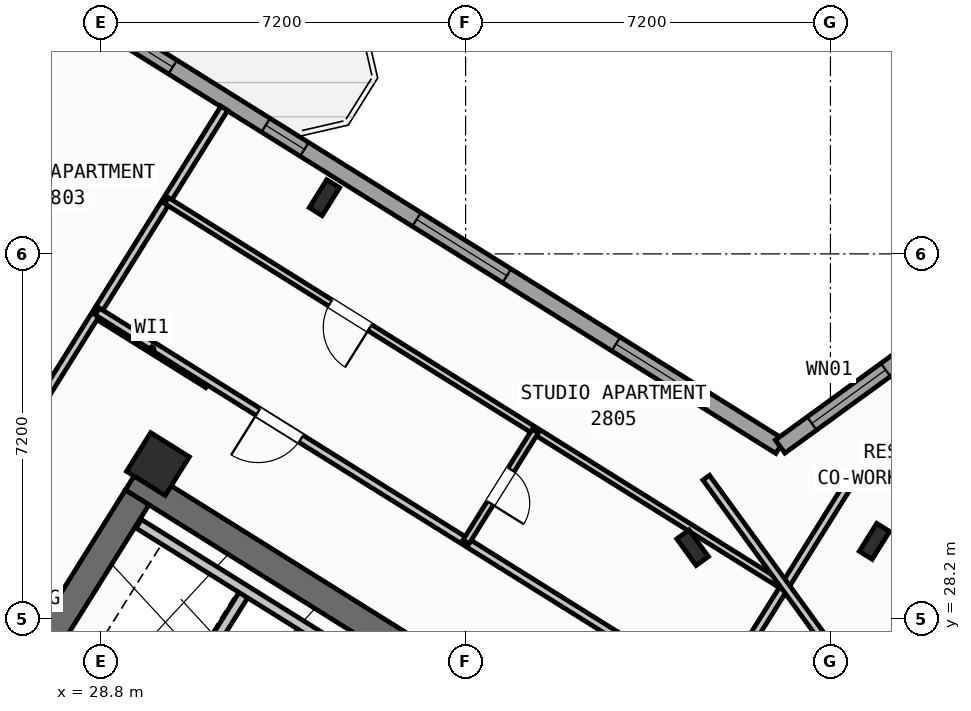
"""IFC4 building model, lengths in metres.
Left out: names, types, materials, properties, quantities, classifications, styles, units other than length and angle.
Written with IfcOpenShell. Run it as: python <this file> out.ifc"""

import sys

from ifc_helpers import new_model, si_unit, direction, frame, frame_2d, origin, origin_2d, place, context, subcontext, project, spatial, rectangle, hollow_rectangle, i_section, extrude, source, transform, mapped, element, fill, save


model = new_model("IFC4")
c1 = context("Model", 3, precision=1e-05, world=origin(), true_north=direction((0.0, 1.0)))
c2 = subcontext(c1, "Body", "Model", "MODEL_VIEW")
j1 = project(units=[si_unit("LENGTHUNIT", "METRE"), si_unit("PLANEANGLEUNIT", "RADIAN")], contexts=[c1])
p1 = place(None, origin())
s1 = spatial("IfcSite", under=j1, at=p1, CompositionType="ELEMENT")
p2 = place(p1, origin())
s2 = spatial("IfcBuilding", under=s1, at=p2, CompositionType="ELEMENT")
p3 = place(p2, frame((0.0, 0.0, 112.5)))
s3 = spatial("IfcBuildingStorey", under=s2, at=p3, CompositionType="ELEMENT", Elevation=112.5)
p4 = place(p3, frame((40.573, 24.01, 0.0), z_axis=(0.0, 0.0, 1.0), x_axis=(-0.848047359947, 0.529920442413, 0.0)))
e1 = element("IfcWall", 1, at=p4, inside=s3, PredefinedType="SHEAR", context=c2, shape_type="SweptSolid", body=[
    extrude(rectangle(XDim=13.14, YDim=0.55, at=frame_2d((6.57, 0.0))), origin(), (0.0, 0.0, 1.0), 3.35),
])
p5 = place(p3, frame((29.517, 30.594, 0.0), z_axis=(0.0, 0.0, 1.0), x_axis=(-0.529906864564, -0.848055844204, 0.0)))
e2 = element("IfcWall", 2, at=p5, inside=s3, PredefinedType="SHEAR", context=c2, shape_type="SweptSolid", body=[
    extrude(rectangle(XDim=3.575, YDim=0.55, at=frame_2d((1.788, 0.0))), origin(), (0.0, 0.0, 1.0), 3.35),
])
p6 = place(p3, frame((44.365, 24.142, 0.0), z_axis=(0.0, 0.0, 1.0), x_axis=(0.809024304885, 0.587775190107, 0.0)))
e3 = element("IfcWall", 3, at=p6, inside=s3, PredefinedType="SHEAR", context=c2, shape_type="SweptSolid", body=[
    extrude(rectangle(XDim=12.34, YDim=0.55, at=frame_2d((6.17, 0.0))), origin(), (0.0, 0.0, 1.0), 3.35),
])
m1 = source(origin(), c2, "Body", "SweptSolid", [
    extrude(i_section(OverallWidth=0.3, OverallDepth=0.65, WebThickness=0.016, FlangeThickness=0.031, at=origin_2d()), origin(), (0.0, 0.0, 1.0), 3.6),
])
for number, where, z_axis, x_axis in (
    (4, (44.068, 29.726, 0.0), (0.0, 0.0, 1.0), (-0.848, 0.53, 0.0)),
    (5, (33.213, 36.509, 0.0), (0.0, 0.0, 1.0), (-0.848, 0.53, 0.0)),
):
    element("IfcColumn", number, at=place(p3, frame(where, z_axis=z_axis, x_axis=x_axis)), inside=s3, PredefinedType="COLUMN", context=c2, shape_type="MappedRepresentation", body=[
        mapped(m1, transform((0.0, 0.0, 0.0), scale=1.0)),
    ])
m2 = source(origin(), c2, "Body", "SweptSolid", [
    extrude(hollow_rectangle(XDim=0.9, YDim=0.9, WallThickness=0.036, at=origin_2d()), origin(), (0.0, 0.0, 1.0), 3.6),
])
p7 = place(p3, frame((29.928, 31.251, 0.0), z_axis=(0.0, 0.0, 1.0), x_axis=(-0.848048096156, 0.529919264233, 0.0)))
e6 = element("IfcColumn", 6, at=p7, inside=s3, PredefinedType="COLUMN", context=c2, shape_type="MappedRepresentation", body=[
    mapped(m2, transform((0.0, 0.0, 0.0), scale=1.0)),
])
p8 = place(p3, frame((40.479, 29.601, 0.0), z_axis=(0.0, 0.0, 1.0), x_axis=(0.809016994375, 0.587785252292, 0.0)))
e7 = element("IfcColumn", 7, at=p8, inside=s3, PredefinedType="COLUMN", context=c2, shape_type="MappedRepresentation", body=[
    mapped(m1, transform((0.0, 0.0, 0.0), scale=1.0)),
])
p9 = place(p3, frame((31.76, 12.183, 0.0), z_axis=(0.0, 0.0, 1.0), x_axis=(-0.848047074256, 0.529920899612, 0.0)))
e8 = element("IfcWall", 8, at=p9, inside=s3, PredefinedType="STANDARD", context=c2, shape_type="SweptSolid", body=[
    extrude(rectangle(XDim=30.652, YDim=0.32, at=frame_2d((15.326, 0.0))), origin(), (0.0, 0.0, 1.0), 3.35),
])
p10 = place(p9, frame((15.153, 0.0, 0.0)))
e9 = element("IfcOpeningElement", 9, at=p10, cuts=e8, PredefinedType="OPENING", context=c2, shape_type="SweptSolid", body=[
    extrude(rectangle(XDim=1.2, YDim=2.15, at=frame_2d((0.6, 1.075))), frame((0.0, 0.17, 0.0), z_axis=(0.0, -1.0, 0.0), x_axis=(1.0, 0.0, 0.0)), (0.0, 0.0, 1.0), 0.34),
])
p11 = place(p9, frame((2.002, 0.0, 0.8)))
e10 = element("IfcOpeningElement", 10, at=p11, cuts=e8, PredefinedType="OPENING", context=c2, shape_type="SweptSolid", body=[
    extrude(rectangle(XDim=2.1, YDim=1.55, at=frame_2d((1.05, 0.775))), frame((0.0, 0.17, 0.0), z_axis=(0.0, -1.0, 0.0), x_axis=(1.0, 0.0, 0.0)), (0.0, 0.0, 1.0), 0.34),
])
p12 = place(p9, frame((7.206, 0.0, 0.8)))
e11 = element("IfcOpeningElement", 11, at=p12, cuts=e8, PredefinedType="OPENING", context=c2, shape_type="SweptSolid", body=[
    extrude(rectangle(XDim=2.1, YDim=1.55, at=frame_2d((1.05, 0.775))), frame((0.0, 0.17, 0.0), z_axis=(0.0, -1.0, 0.0), x_axis=(1.0, 0.0, 0.0)), (0.0, 0.0, 1.0), 0.34),
])
p13 = place(p9, frame((12.648, 0.0, 1.0)))
e12 = element("IfcOpeningElement", 12, at=p13, cuts=e8, PredefinedType="OPENING", context=c2, shape_type="SweptSolid", body=[
    extrude(rectangle(XDim=0.9, YDim=1.25, at=frame_2d((0.45, 0.625))), frame((0.0, 0.17, 0.0), z_axis=(0.0, -1.0, 0.0), x_axis=(1.0, 0.0, 0.0)), (0.0, 0.0, 1.0), 0.34),
])
p14 = place(p9, frame((19.59, 0.0, 0.95)))
e13 = element("IfcOpeningElement", 13, at=p14, cuts=e8, PredefinedType="OPENING", context=c2, shape_type="SweptSolid", body=[
    extrude(rectangle(XDim=1.2, YDim=1.4, at=frame_2d((0.6, 0.7))), frame((0.0, 0.17, 0.0), z_axis=(0.0, -1.0, 0.0), x_axis=(1.0, 0.0, 0.0)), (0.0, 0.0, 1.0), 0.34),
])
p15 = place(p9, frame((25.966, 0.0, 1.0)))
e14 = element("IfcOpeningElement", 14, at=p15, cuts=e8, PredefinedType="OPENING", context=c2, shape_type="SweptSolid", body=[
    extrude(rectangle(XDim=0.9, YDim=1.25, at=frame_2d((0.45, 0.625))), frame((0.0, 0.17, 0.0), z_axis=(0.0, -1.0, 0.0), x_axis=(1.0, 0.0, 0.0)), (0.0, 0.0, 1.0), 0.34),
])
p16 = place(p9, frame((28.871, 0.0, 1.0)))
e15 = element("IfcOpeningElement", 15, at=p16, cuts=e8, PredefinedType="OPENING", context=c2, shape_type="SweptSolid", body=[
    extrude(rectangle(XDim=0.9, YDim=1.25, at=frame_2d((0.45, 0.625))), frame((0.0, 0.17, 0.0), z_axis=(0.0, -1.0, 0.0), x_axis=(1.0, 0.0, 0.0)), (0.0, 0.0, 1.0), 0.34),
])
p17 = place(p3, frame((17.424, 47.083, 0.0), z_axis=(0.0, 0.0, 1.0), x_axis=(0.848049927979, -0.529916332693, 0.0)))
e16 = element("IfcWall", 16, at=p17, inside=s3, PredefinedType="STANDARD", context=c2, shape_type="SweptSolid", body=[
    extrude(rectangle(XDim=29.223, YDim=0.32, at=frame_2d((14.612, 0.0))), origin(), (0.0, 0.0, 1.0), 3.35),
])
p18 = place(p17, frame((3.77, 0.0, 0.0)))
e17 = element("IfcOpeningElement", 17, at=p18, cuts=e16, PredefinedType="OPENING", context=c2, shape_type="SweptSolid", body=[
    extrude(rectangle(XDim=1.05, YDim=2.15, at=frame_2d((0.525, 1.075))), frame((0.0, 0.17, 0.0), z_axis=(0.0, -1.0, 0.0), x_axis=(1.0, 0.0, 0.0)), (0.0, 0.0, 1.0), 0.34),
])
p19 = place(p17, frame((0.9, 0.0, 0.8)))
e18 = element("IfcOpeningElement", 18, at=p19, cuts=e16, PredefinedType="OPENING", context=c2, shape_type="SweptSolid", body=[
    extrude(rectangle(XDim=2.1, YDim=1.55, at=frame_2d((1.05, 0.775))), frame((0.0, 0.17, 0.0), z_axis=(0.0, -1.0, 0.0), x_axis=(1.0, 0.0, 0.0)), (0.0, 0.0, 1.0), 0.34),
])
p20 = place(p17, frame((6.972, 0.0, 1.0)))
e19 = element("IfcOpeningElement", 19, at=p20, cuts=e16, PredefinedType="OPENING", context=c2, shape_type="SweptSolid", body=[
    extrude(rectangle(XDim=0.9, YDim=1.25, at=frame_2d((0.45, 0.625))), frame((0.0, 0.17, 0.0), z_axis=(0.0, -1.0, 0.0), x_axis=(1.0, 0.0, 0.0)), (0.0, 0.0, 1.0), 0.34),
])
p21 = place(p17, frame((9.847, 0.0, 0.85)))
e20 = element("IfcOpeningElement", 20, at=p21, cuts=e16, PredefinedType="OPENING", context=c2, shape_type="SweptSolid", body=[
    extrude(rectangle(XDim=1.5, YDim=1.5, at=frame_2d((0.75, 0.75))), frame((0.0, 0.17, 0.0), z_axis=(0.0, -1.0, 0.0), x_axis=(1.0, 0.0, 0.0)), (0.0, 0.0, 1.0), 0.34),
])
p22 = place(p17, frame((13.889, 0.0, 0.95)))
e21 = element("IfcOpeningElement", 21, at=p22, cuts=e16, PredefinedType="OPENING", context=c2, shape_type="SweptSolid", body=[
    extrude(rectangle(XDim=1.2, YDim=1.4, at=frame_2d((0.6, 0.7))), frame((0.0, 0.17, 0.0), z_axis=(0.0, -1.0, 0.0), x_axis=(1.0, 0.0, 0.0)), (0.0, 0.0, 1.0), 0.34),
])
p23 = place(p17, frame((17.254, 0.0, 1.0)))
e22 = element("IfcOpeningElement", 22, at=p23, cuts=e16, PredefinedType="OPENING", context=c2, shape_type="SweptSolid", body=[
    extrude(rectangle(XDim=0.9, YDim=1.25, at=frame_2d((0.45, 0.625))), frame((0.0, 0.17, 0.0), z_axis=(0.0, -1.0, 0.0), x_axis=(1.0, 0.0, 0.0)), (0.0, 0.0, 1.0), 0.34),
])
p24 = place(p17, frame((20.764, 0.0, 0.8)))
e23 = element("IfcOpeningElement", 23, at=p24, cuts=e16, PredefinedType="OPENING", context=c2, shape_type="SweptSolid", body=[
    extrude(rectangle(XDim=2.1, YDim=1.55, at=frame_2d((1.05, 0.775))), frame((0.0, 0.17, 0.0), z_axis=(0.0, -1.0, 0.0), x_axis=(1.0, 0.0, 0.0)), (0.0, 0.0, 1.0), 0.34),
])
p25 = place(p17, frame((25.403, 0.0, 0.8)))
e24 = element("IfcOpeningElement", 24, at=p25, cuts=e16, PredefinedType="OPENING", context=c2, shape_type="SweptSolid", body=[
    extrude(rectangle(XDim=2.1, YDim=1.55, at=frame_2d((1.05, 0.775))), frame((0.0, 0.17, 0.0), z_axis=(0.0, -1.0, 0.0), x_axis=(1.0, 0.0, 0.0)), (0.0, 0.0, 1.0), 0.34),
])
p26 = place(p3, frame((42.207, 31.597, 0.0), z_axis=(0.0, 0.0, 1.0), x_axis=(0.809020333377, 0.587780656523, 0.0)))
e25 = element("IfcWall", 25, at=p26, inside=s3, PredefinedType="STANDARD", context=c2, shape_type="SweptSolid", body=[
    extrude(rectangle(XDim=15.223, YDim=0.32, at=frame_2d((7.611, 0.0))), origin(), (0.0, 0.0, 1.0), 3.35),
])
p27 = place(p26, frame((12.82, 0.0, 0.0)))
e26 = element("IfcOpeningElement", 26, at=p27, cuts=e25, PredefinedType="OPENING", context=c2, shape_type="SweptSolid", body=[
    extrude(rectangle(XDim=1.05, YDim=2.15, at=frame_2d((0.525, 1.075))), frame((0.0, 0.17, 0.0), z_axis=(0.0, -1.0, 0.0), x_axis=(1.0, 0.0, 0.0)), (0.0, 0.0, 1.0), 0.34),
])
p28 = place(p26, frame((0.775, 0.0, 0.85)))
e27 = element("IfcOpeningElement", 27, at=p28, cuts=e25, PredefinedType="OPENING", context=c2, shape_type="SweptSolid", body=[
    extrude(rectangle(XDim=1.8, YDim=1.5, at=frame_2d((0.9, 0.75))), frame((0.0, 0.17, 0.0), z_axis=(0.0, -1.0, 0.0), x_axis=(1.0, 0.0, 0.0)), (0.0, 0.0, 1.0), 0.34),
])
p29 = place(p26, frame((5.544, 0.0, 0.85)))
e28 = element("IfcOpeningElement", 28, at=p29, cuts=e25, PredefinedType="OPENING", context=c2, shape_type="SweptSolid", body=[
    extrude(rectangle(XDim=1.8, YDim=1.5, at=frame_2d((0.9, 0.75))), frame((0.0, 0.17, 0.0), z_axis=(0.0, -1.0, 0.0), x_axis=(1.0, 0.0, 0.0)), (0.0, 0.0, 1.0), 0.34),
])
p30 = place(p26, frame((10.219, 0.0, 1.0)))
e29 = element("IfcOpeningElement", 29, at=p30, cuts=e25, PredefinedType="OPENING", context=c2, shape_type="SweptSolid", body=[
    extrude(rectangle(XDim=0.9, YDim=1.25, at=frame_2d((0.45, 0.625))), frame((0.0, 0.17, 0.0), z_axis=(0.0, -1.0, 0.0), x_axis=(1.0, 0.0, 0.0)), (0.0, 0.0, 1.0), 0.34),
])
p31 = place(p3, frame((31.645, 28.716, 0.0), z_axis=(0.0, 0.0, 1.0), x_axis=(-0.52986693015, -0.848080795876, 0.0)))
e30 = element("IfcWall", 30, at=p31, inside=s3, PredefinedType="STANDARD", context=c2, shape_type="SweptSolid", body=[
    extrude(rectangle(XDim=2.66, YDim=0.2, at=frame_2d((1.33, 0.0))), origin(), (0.0, 0.0, 1.0), 3.34),
])
p32 = place(p3, frame((33.363, 27.69, 0.0), z_axis=(0.0, 0.0, 1.0), x_axis=(-0.848047090064, 0.529920874315, 0.0)))
e31 = element("IfcWall", 31, at=p32, inside=s3, PredefinedType="STANDARD", context=c2, shape_type="SweptSolid", body=[
    extrude(rectangle(XDim=4.498, YDim=0.2, at=frame_2d((2.249, 0.0))), origin(), (0.0, 0.0, 1.0), 3.34),
])
p33 = place(p3, frame((30.914, 32.829, 0.0), z_axis=(0.0, 0.0, 1.0), x_axis=(-0.848008813643, 0.529982124211, 0.0)))
e32 = element("IfcWall", 32, at=p33, inside=s3, PredefinedType="PARTITIONING", context=c2, shape_type="SweptSolid", body=[
    extrude(rectangle(XDim=2.61, YDim=0.16, at=frame_2d((1.305, 0.0))), origin(), (0.0, 0.0, 1.0), 3.34),
])
p34 = place(p3, frame((31.239, 38.274, 0.0), z_axis=(0.0, 0.0, 1.0), x_axis=(-0.529925472745, -0.848044216616, 0.0)))
e33 = element("IfcWall", 33, at=p34, inside=s3, PredefinedType="PARTITIONING", context=c2, shape_type="SweptSolid", body=[
    extrude(rectangle(XDim=11.65, YDim=0.16, at=frame_2d((5.825, 0.0))), origin(), (0.0, 0.0, 1.0), 3.34),
])
p35 = place(p3, frame((41.936, 26.012, 0.0), z_axis=(0.0, 0.0, 1.0), x_axis=(-0.848051154596, 0.529914369676, 0.0)))
e34 = element("IfcWall", 34, at=p35, inside=s3, PredefinedType="PARTITIONING", context=c2, shape_type="SweptSolid", body=[
    extrude(rectangle(XDim=15.57, YDim=0.16, at=frame_2d((7.785, 0.0))), origin(), (0.0, 0.0, 1.0), 3.34),
])
p36 = place(p35, frame((10.83, 0.0, 0.0)))
e35 = element("IfcOpeningElement", 35, at=p36, cuts=e34, PredefinedType="OPENING", context=c2, shape_type="SweptSolid", body=[
    extrude(rectangle(XDim=1.0, YDim=2.1, at=frame_2d((0.5, 1.05))), frame((0.0, 0.09, 0.0), z_axis=(0.0, -1.0, 0.0), x_axis=(1.0, 0.0, 0.0)), (0.0, 0.0, 1.0), 0.18),
])
p37 = place(p3, frame((43.704, 31.086, 0.0), z_axis=(0.0, 0.0, 1.0), x_axis=(-0.529906828443, -0.848055866774, 0.0)))
e36 = element("IfcWall", 36, at=p37, inside=s3, PredefinedType="PARTITIONING", context=c2, shape_type="SweptSolid", body=[
    extrude(rectangle(XDim=5.48, YDim=0.16, at=frame_2d((2.74, 0.0))), origin(), (0.0, 0.0, 1.0), 3.34),
])
p38 = place(p3, frame((42.226, 28.873, 0.0), z_axis=(0.0, 0.0, 1.0), x_axis=(-0.848049134363, 0.529917602752, 0.0)))
e37 = element("IfcWall", 37, at=p38, inside=s3, PredefinedType="PLUMBINGWALL", context=c2, shape_type="SweptSolid", body=[
    extrude(rectangle(XDim=14.3, YDim=0.14, at=frame_2d((7.15, 0.0))), origin(), (0.0, 0.0, 1.0), 3.34),
])
p39 = place(p38, frame((9.57, 0.0, 0.0)))
e38 = element("IfcOpeningElement", 38, at=p39, cuts=e37, PredefinedType="OPENING", context=c2, shape_type="SweptSolid", body=[
    extrude(rectangle(XDim=0.92, YDim=2.08, at=frame_2d((0.46, 1.04))), frame((0.0, 0.08, 0.0), z_axis=(0.0, -1.0, 0.0), x_axis=(1.0, 0.0, 0.0)), (0.0, 0.0, 1.0), 0.16),
])
p40 = place(p3, frame((37.375, 31.904, 0.0), z_axis=(0.0, 0.0, 1.0), x_axis=(-0.529913878929, -0.848051461244, 0.0)))
e39 = element("IfcWall", 39, at=p40, inside=s3, PredefinedType="PLUMBINGWALL", context=c2, shape_type="SweptSolid", body=[
    extrude(rectangle(XDim=2.58, YDim=0.14, at=frame_2d((1.29, 0.0))), origin(), (0.0, 0.0, 1.0), 3.34),
])
p41 = place(p40, frame((0.9, 0.0, 0.0)))
e40 = element("IfcOpeningElement", 40, at=p41, cuts=e39, PredefinedType="OPENING", context=c2, shape_type="SweptSolid", body=[
    extrude(rectangle(XDim=0.78, YDim=2.05, at=frame_2d((0.39, 1.025))), frame((0.0, 0.08, 0.0), z_axis=(0.0, -1.0, 0.0), x_axis=(1.0, 0.0, 0.0)), (0.0, 0.0, 1.0), 0.16),
])
p42 = place(p3, frame((42.866, 26.044, 0.0), z_axis=(0.0, 0.0, 1.0), x_axis=(0.809020254154, 0.587780765566, 0.0)))
e41 = element("IfcWall", 41, at=p42, inside=s3, PredefinedType="PARTITIONING", context=c2, shape_type="SweptSolid", body=[
    extrude(rectangle(XDim=14.67, YDim=0.16, at=frame_2d((7.335, 0.0))), origin(), (0.0, 0.0, 1.0), 3.34),
])
p43 = place(p42, frame((3.215, 0.0, 0.0)))
e42 = element("IfcOpeningElement", 42, at=p43, cuts=e41, PredefinedType="OPENING", context=c2, shape_type="SweptSolid", body=[
    extrude(rectangle(XDim=1.0, YDim=2.1, at=frame_2d((0.5, 1.05))), frame((0.0, 0.09, 0.0), z_axis=(0.0, -1.0, 0.0), x_axis=(1.0, 0.0, 0.0)), (0.0, 0.0, 1.0), 0.18),
])
p44 = place(p42, frame((9.915, 0.0, 0.0)))
e43 = element("IfcOpeningElement", 43, at=p44, cuts=e41, PredefinedType="OPENING", context=c2, shape_type="SweptSolid", body=[
    extrude(rectangle(XDim=1.0, YDim=2.1, at=frame_2d((0.5, 1.05))), frame((0.0, 0.09, 0.0), z_axis=(0.0, -1.0, 0.0), x_axis=(1.0, 0.0, 0.0)), (0.0, 0.0, 1.0), 0.18),
])
p45 = place(p3, frame((43.969, 26.55, 0.0), z_axis=(0.0, 0.0, 1.0), x_axis=(-0.587776919386, 0.80902304852, 0.0)))
e44 = element("IfcWall", 44, at=p45, inside=s3, PredefinedType="PARTITIONING", context=c2, shape_type="SweptSolid", body=[
    extrude(rectangle(XDim=5.48, YDim=0.16, at=frame_2d((2.74, 0.0))), origin(), (0.0, 0.0, 1.0), 3.34),
])
m3 = source(origin(), c2, "Body", "SweptSolid", [
    extrude(rectangle(XDim=1.2, YDim=1.4, at=frame_2d((0.6, 0.7))), frame((0.0, 0.03, 0.0), z_axis=(0.0, -1.0, 0.0), x_axis=(1.0, 0.0, 0.0)), (0.0, 0.0, 1.0), 0.06),
])
p46 = place(p22, origin())
e45 = element("IfcWindow", 45, at=p46, inside=s3, PartitioningType="SINGLE_PANEL", PredefinedType="WINDOW", context=c2, shape_type="MappedRepresentation", body=[
    mapped(m3, transform((0.0, 0.0, 0.0), scale=1.0)),
])
fill(e21, e45)
m4 = source(origin(), c2, "Body", "SweptSolid", [
    extrude(rectangle(XDim=0.9, YDim=1.25, at=frame_2d((0.45, 0.625))), frame((0.0, 0.03, 0.0), z_axis=(0.0, -1.0, 0.0), x_axis=(1.0, 0.0, 0.0)), (0.0, 0.0, 1.0), 0.06),
])
p47 = place(p23, origin())
e46 = element("IfcWindow", 46, at=p47, inside=s3, PartitioningType="SINGLE_PANEL", PredefinedType="WINDOW", context=c2, shape_type="MappedRepresentation", body=[
    mapped(m4, transform((0.0, 0.0, 0.0), scale=1.0)),
])
fill(e22, e46)
m5 = source(origin(), c2, "Body", "SweptSolid", [
    extrude(rectangle(XDim=2.1, YDim=1.55, at=frame_2d((1.05, 0.775))), frame((0.0, 0.03, 0.0), z_axis=(0.0, -1.0, 0.0), x_axis=(1.0, 0.0, 0.0)), (0.0, 0.0, 1.0), 0.06),
])
p48 = place(p24, origin())
e47 = element("IfcWindow", 47, at=p48, inside=s3, PartitioningType="SINGLE_PANEL", PredefinedType="WINDOW", context=c2, shape_type="MappedRepresentation", body=[
    mapped(m5, transform((0.0, 0.0, 0.0), scale=1.0)),
])
fill(e23, e47)
p49 = place(p25, origin())
e48 = element("IfcWindow", 48, at=p49, inside=s3, PartitioningType="SINGLE_PANEL", PredefinedType="WINDOW", context=c2, shape_type="MappedRepresentation", body=[
    mapped(m5, transform((0.0, 0.0, 0.0), scale=1.0)),
])
fill(e24, e48)
m6 = source(origin(), c2, "Body", "SweptSolid", [
    extrude(rectangle(XDim=1.8, YDim=1.5, at=frame_2d((0.9, 0.75))), frame((0.0, 0.03, 0.0), z_axis=(0.0, -1.0, 0.0), x_axis=(1.0, 0.0, 0.0)), (0.0, 0.0, 1.0), 0.06),
])
p50 = place(p28, origin())
e49 = element("IfcWindow", 49, at=p50, inside=s3, PartitioningType="SINGLE_PANEL", PredefinedType="WINDOW", context=c2, shape_type="MappedRepresentation", body=[
    mapped(m6, transform((0.0, 0.0, 0.0), scale=1.0)),
])
fill(e27, e49)
m7 = source(origin(), c2, "Body", "SweptSolid", [
    extrude(rectangle(XDim=1.0, YDim=2.1, at=frame_2d((0.5, 1.05))), frame((0.0, 0.025, 0.0), z_axis=(0.0, -1.0, 0.0), x_axis=(1.0, 0.0, 0.0)), (0.0, 0.0, 1.0), 0.05),
])
p51 = place(p36, origin())
e50 = element("IfcDoor", 50, at=p51, inside=s3, OperationType="SINGLE_SWING_RIGHT", PredefinedType="DOOR", context=c2, shape_type="MappedRepresentation", body=[
    mapped(m7, transform((0.0, 0.0, 0.0), scale=1.0)),
])
fill(e35, e50)
m8 = source(origin(), c2, "Body", "SweptSolid", [
    extrude(rectangle(XDim=0.92, YDim=2.08, at=frame_2d((0.46, 1.04))), frame((0.0, 0.025, 0.0), z_axis=(0.0, -1.0, 0.0), x_axis=(1.0, 0.0, 0.0)), (0.0, 0.0, 1.0), 0.05),
])
p52 = place(p39, origin())
e51 = element("IfcDoor", 51, at=p52, inside=s3, OperationType="SINGLE_SWING_LEFT", PredefinedType="DOOR", context=c2, shape_type="MappedRepresentation", body=[
    mapped(m8, transform((0.0, 0.0, 0.0), scale=1.0)),
])
fill(e38, e51)
m9 = source(origin(), c2, "Body", "SweptSolid", [
    extrude(rectangle(XDim=0.78, YDim=2.05, at=frame_2d((0.39, 1.025))), frame((0.0, 0.025, 0.0), z_axis=(0.0, -1.0, 0.0), x_axis=(1.0, 0.0, 0.0)), (0.0, 0.0, 1.0), 0.05),
])
p53 = place(p41, origin())
e52 = element("IfcDoor", 52, at=p53, inside=s3, OperationType="SINGLE_SWING_RIGHT", PredefinedType="DOOR", context=c2, shape_type="MappedRepresentation", body=[
    mapped(m9, transform((0.0, 0.0, 0.0), scale=1.0)),
])
fill(e40, e52)
save(model, sys.argv[1])
